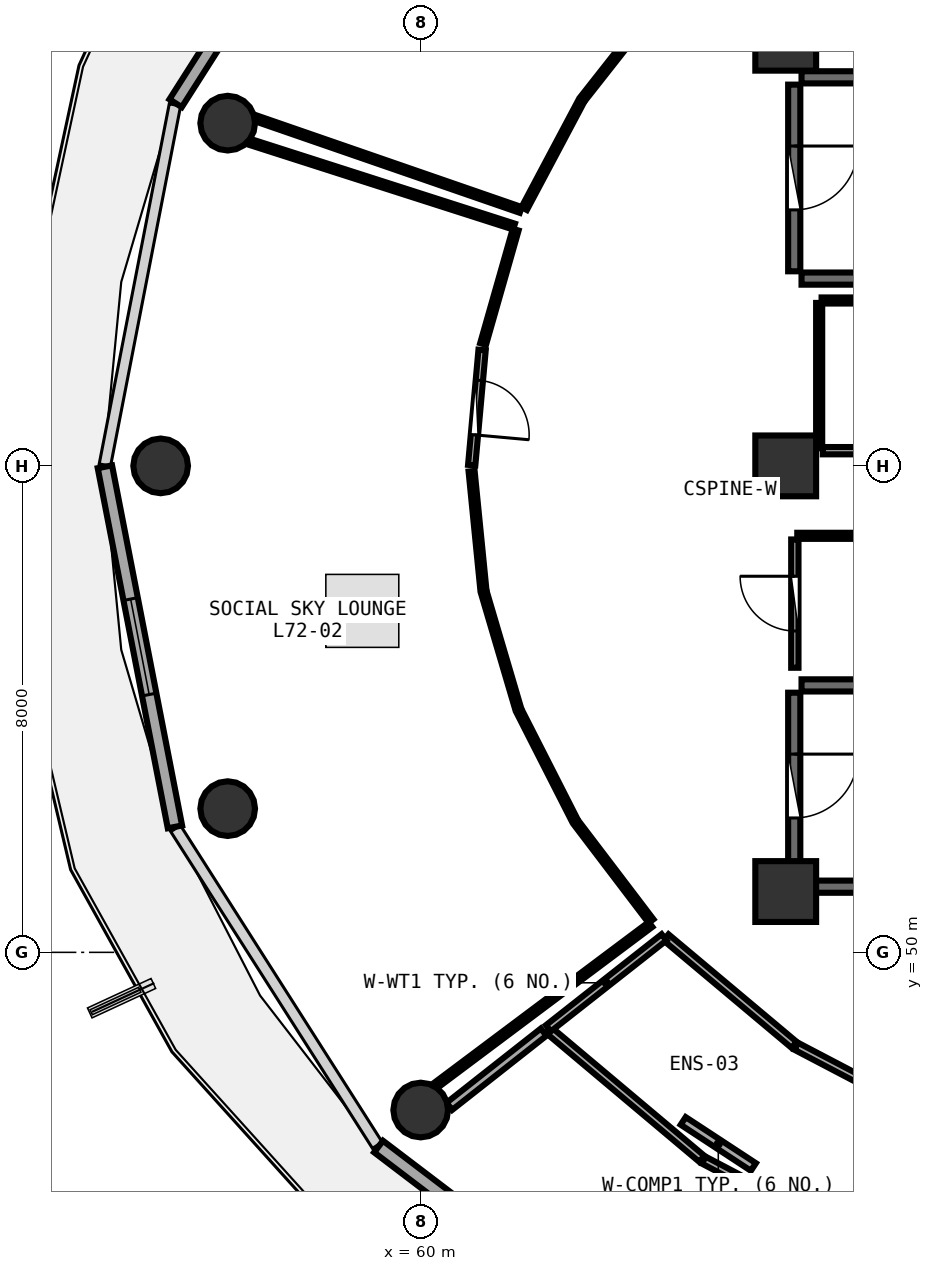
"""IFC4 building model, lengths in metres.
Left out: names, types, materials, properties, quantities, classifications, styles, units other than length and angle.
Written with IfcOpenShell. Run it as: python <this file> out.ifc"""

import sys

from ifc_helpers import new_model, si_unit, direction, frame, frame_2d, origin, origin_2d, place, context, subcontext, project, spatial, rectangle, circle, extrude, element, fill, save


model = new_model("IFC4")
c1 = context("Model", 3, precision=1e-05, world=origin(), true_north=direction((0.0, 1.0)))
c2 = subcontext(c1, "Body", "Model", "MODEL_VIEW")
j1 = project(units=[si_unit("LENGTHUNIT", "METRE"), si_unit("PLANEANGLEUNIT", "RADIAN")], contexts=[c1])
p1 = place(None, origin())
s1 = spatial("IfcSite", under=j1, at=p1, CompositionType="ELEMENT")
p2 = place(p1, origin())
s2 = spatial("IfcBuilding", under=s1, at=p2, CompositionType="ELEMENT")
p3 = place(p2, frame((0.0, 0.0, 282.45)))
s3 = spatial("IfcBuildingStorey", under=s2, at=p3, CompositionType="ELEMENT", Elevation=282.45)
for number, where, z_axis, x_axis in (
    (1, (66.0, 51.0, 0.0), (0.0, 0.0, 1.0), (1.0, 0.0, 0.0)),
    (2, (66.0, 65.0, 0.0), (0.0, 0.0, 1.0), (1.0, 0.0, 0.0)),
    (3, (66.0, 58.0, 0.0), (0.0, 0.0, 1.0), (1.0, 0.0, 0.0)),
):
    element("IfcColumn", number, at=place(p3, frame(where, z_axis=z_axis, x_axis=x_axis)), inside=s3, PredefinedType="PILASTER", context=c2, shape_type="SweptSolid", body=[
        extrude(rectangle(XDim=1.0, YDim=1.0, at=origin_2d()), origin(), (0.0, 0.0, 1.0), 3.75),
    ])
for number, where, z_axis, x_axis in (
    (4, (56.823, 63.636, 0.0), (0.0, 0.0, 1.0), (1.0, 0.0, 0.0)),
    (5, (55.72, 58.0, 0.0), (0.0, 0.0, 1.0), (1.0, 0.0, 0.0)),
    (6, (56.823, 52.364, 0.0), (0.0, 0.0, 1.0), (1.0, 0.0, 0.0)),
    (7, (59.997, 47.407, 0.0), (0.0, 0.0, 1.0), (1.0, 0.0, 0.0)),
):
    element("IfcColumn", number, at=place(p3, frame(where, z_axis=z_axis, x_axis=x_axis)), inside=s3, PredefinedType="COLUMN", context=c2, shape_type="SweptSolid", body=[
        extrude(circle(Radius=0.45, at=origin_2d()), origin(), (0.0, 0.0, 1.0), 3.75),
    ])
p4 = place(p3, frame((59.284, 69.172, 0.0), z_axis=(0.0, 0.0, 1.0), x_axis=(-0.537271968456, -0.843409053728, 0.0)))
e8 = element("IfcWall", 8, at=p4, inside=s3, PredefinedType="SOLIDWALL", context=c2, shape_type="SweptSolid", body=[
    extrude(rectangle(XDim=6.175, YDim=0.24, at=frame_2d((3.087, 0.0))), origin(), (0.0, 0.0, 1.0), 3.475),
])
p5 = place(p4, frame((2.613, 0.0, 0.0)))
e9 = element("IfcOpeningElement", 9, at=p5, cuts=e8, PredefinedType="OPENING", context=c2, shape_type="SweptSolid", body=[
    extrude(rectangle(XDim=0.95, YDim=2.1, at=frame_2d((0.475, 1.05))), frame((0.0, 0.13, 0.0), z_axis=(0.0, -1.0, 0.0), x_axis=(1.0, 0.0, 0.0)), (0.0, 0.0, 1.0), 0.26),
])
p6 = place(p4, frame((3.913, 0.0, 0.85)))
e10 = element("IfcOpeningElement", 10, at=p6, cuts=e8, PredefinedType="OPENING", context=c2, shape_type="SweptSolid", body=[
    extrude(rectangle(XDim=1.2, YDim=1.45, at=frame_2d((0.6, 0.725))), frame((0.0, 0.13, 0.0), z_axis=(0.0, -1.0, 0.0), x_axis=(1.0, 0.0, 0.0)), (0.0, 0.0, 1.0), 0.26),
])
p7 = place(p3, frame((54.803, 57.985, 0.0), z_axis=(0.0, 0.0, 1.0), x_axis=(0.190969309115, -0.981596008028, 0.0)))
e11 = element("IfcWall", 11, at=p7, inside=s3, PredefinedType="SOLIDWALL", context=c2, shape_type="SweptSolid", body=[
    extrude(rectangle(XDim=6.033, YDim=0.24, at=frame_2d((3.017, 0.0))), origin(), (0.0, 0.0, 1.0), 3.475),
])
p8 = place(p7, frame((2.216, 0.0, 0.85)))
e12 = element("IfcOpeningElement", 12, at=p8, cuts=e11, PredefinedType="OPENING", context=c2, shape_type="SweptSolid", body=[
    extrude(rectangle(XDim=1.6, YDim=1.45, at=frame_2d((0.8, 0.725))), frame((0.0, 0.13, 0.0), z_axis=(0.0, -1.0, 0.0), x_axis=(1.0, 0.0, 0.0)), (0.0, 0.0, 1.0), 0.26),
])
p9 = place(p3, frame((59.304, 46.806, 0.0), z_axis=(0.0, 0.0, 1.0), x_axis=(0.796010444211, -0.605282886514, 0.0)))
e13 = element("IfcWall", 13, at=p9, inside=s3, PredefinedType="SOLIDWALL", context=c2, shape_type="SweptSolid", body=[
    extrude(rectangle(XDim=6.387, YDim=0.24, at=frame_2d((3.194, 0.0))), origin(), (0.0, 0.0, 1.0), 3.475),
])
p10 = place(p9, frame((2.394, 0.0, 0.85)))
e14 = element("IfcOpeningElement", 14, at=p10, cuts=e13, PredefinedType="OPENING", context=c2, shape_type="SweptSolid", body=[
    extrude(rectangle(XDim=1.6, YDim=1.45, at=frame_2d((0.8, 0.725))), frame((0.0, 0.13, 0.0), z_axis=(0.0, -1.0, 0.0), x_axis=(1.0, 0.0, 0.0)), (0.0, 0.0, 1.0), 0.26),
])
for number, where, z_axis, x_axis in (
    (15, (66.26, 61.08, 0.0), (0.0, 0.0, 1.0), (1.0, 0.0, 0.0)),
    (16, (73.42, 64.39, 0.0), (0.0, 0.0, 1.0), (-1.0, 0.0, 0.0)),
):
    element("IfcWall", number, at=place(p3, frame(where, z_axis=z_axis, x_axis=x_axis)), inside=s3, PredefinedType="SHEAR", context=c2, shape_type="SweptSolid", body=[
        extrude(rectangle(XDim=7.16, YDim=0.2, at=frame_2d((3.58, 0.0))), origin(), (0.0, 0.0, 1.0), 3.49),
    ])
p11 = place(p3, frame((66.14, 64.27, 0.0), z_axis=(0.0, 0.0, 1.0), x_axis=(0.0, -1.0, 0.0)))
e17 = element("IfcWall", 17, at=p11, inside=s3, PredefinedType="SHEAR", context=c2, shape_type="SweptSolid", body=[
    extrude(rectangle(XDim=3.07, YDim=0.2, at=frame_2d((1.535, 0.0))), origin(), (0.0, 0.0, 1.0), 3.49),
])
p12 = place(p11, frame((1.01, 0.0, 0.0)))
e18 = element("IfcOpeningElement", 18, at=p12, cuts=e17, PredefinedType="OPENING", context=c2, shape_type="SweptSolid", body=[
    extrude(rectangle(XDim=1.05, YDim=2.1, at=frame_2d((0.525, 1.05))), frame((0.0, 0.11, 0.0), z_axis=(0.0, -1.0, 0.0), x_axis=(1.0, 0.0, 0.0)), (0.0, 0.0, 1.0), 0.22),
])
for number, where, z_axis, x_axis in (
    (19, (66.26, 51.08, 0.0), (0.0, 0.0, 1.0), (1.0, 0.0, 0.0)),
    (20, (73.42, 54.39, 0.0), (0.0, 0.0, 1.0), (-1.0, 0.0, 0.0)),
):
    element("IfcWall", number, at=place(p3, frame(where, z_axis=z_axis, x_axis=x_axis)), inside=s3, PredefinedType="SHEAR", context=c2, shape_type="SweptSolid", body=[
        extrude(rectangle(XDim=7.16, YDim=0.2, at=frame_2d((3.58, 0.0))), origin(), (0.0, 0.0, 1.0), 3.49),
    ])
p13 = place(p3, frame((66.14, 54.27, 0.0), z_axis=(0.0, 0.0, 1.0), x_axis=(0.0, -1.0, 0.0)))
e21 = element("IfcWall", 21, at=p13, inside=s3, PredefinedType="SHEAR", context=c2, shape_type="SweptSolid", body=[
    extrude(rectangle(XDim=3.07, YDim=0.2, at=frame_2d((1.535, 0.0))), origin(), (0.0, 0.0, 1.0), 3.49),
])
p14 = place(p13, frame((1.01, 0.0, 0.0)))
e22 = element("IfcOpeningElement", 22, at=p14, cuts=e21, PredefinedType="OPENING", context=c2, shape_type="SweptSolid", body=[
    extrude(rectangle(XDim=1.05, YDim=2.1, at=frame_2d((0.525, 1.05))), frame((0.0, 0.11, 0.0), z_axis=(0.0, -1.0, 0.0), x_axis=(1.0, 0.0, 0.0)), (0.0, 0.0, 1.0), 0.22),
])
p15 = place(p3, frame((66.61, 58.25, 0.0), z_axis=(0.0, 0.0, 1.0), x_axis=(1.0, 0.0, 0.0)))
e23 = element("IfcWall", 23, at=p15, inside=s3, PredefinedType="PARTITIONING", context=c2, shape_type="SweptSolid", body=[
    extrude(rectangle(XDim=3.33, YDim=0.12, at=frame_2d((1.665, 0.0))), origin(), (0.0, 0.0, 1.0), 3.48),
])
p16 = place(p15, frame((1.215, 0.0, 0.0)))
e24 = element("IfcOpeningElement", 24, at=p16, cuts=e23, PredefinedType="OPENING", context=c2, shape_type="SweptSolid", body=[
    extrude(rectangle(XDim=0.9, YDim=2.08, at=frame_2d((0.45, 1.04))), frame((0.0, 0.07, 0.0), z_axis=(0.0, -1.0, 0.0), x_axis=(1.0, 0.0, 0.0)), (0.0, 0.0, 1.0), 0.14),
])
p17 = place(p3, frame((66.15, 54.68, 0.0), z_axis=(0.0, 0.0, 1.0), x_axis=(0.0, 1.0, 0.0)))
e25 = element("IfcWall", 25, at=p17, inside=s3, PredefinedType="PARTITIONING", context=c2, shape_type="SweptSolid", body=[
    extrude(rectangle(XDim=2.11, YDim=0.12, at=frame_2d((1.055, 0.0))), origin(), (0.0, 0.0, 1.0), 2.775),
])
p18 = place(p17, frame((0.605, 0.0, 0.0)))
e26 = element("IfcOpeningElement", 26, at=p18, cuts=e25, PredefinedType="OPENING", context=c2, shape_type="SweptSolid", body=[
    extrude(rectangle(XDim=0.9, YDim=2.08, at=frame_2d((0.45, 1.04))), frame((0.0, 0.07, 0.0), z_axis=(0.0, -1.0, 0.0), x_axis=(1.0, 0.0, 0.0)), (0.0, 0.0, 1.0), 0.14),
])
p19 = place(p3, frame((61.007, 59.906, 0.0), z_axis=(0.0, 0.0, 1.0), x_axis=(-0.089968706127, -0.995944592795, 0.0)))
e27 = element("IfcWall", 27, at=p19, inside=s3, PredefinedType="PARTITIONING", context=c2, shape_type="SweptSolid", body=[
    extrude(rectangle(XDim=1.902, YDim=0.12, at=frame_2d((0.951, 0.0))), origin(), (0.0, 0.0, 1.0), 3.075),
])
p20 = place(p19, frame((0.501, 0.0, 0.0)))
e28 = element("IfcOpeningElement", 28, at=p20, cuts=e27, PredefinedType="OPENING", context=c2, shape_type="SweptSolid", body=[
    extrude(rectangle(XDim=0.9, YDim=2.08, at=frame_2d((0.45, 1.04))), frame((0.0, 0.07, 0.0), z_axis=(0.0, -1.0, 0.0), x_axis=(1.0, 0.0, 0.0)), (0.0, 0.0, 1.0), 0.14),
])
p21 = place(p3, frame((69.96, 60.72, 0.0), z_axis=(0.0, 0.0, 1.0), x_axis=(-1.0, 0.0, 0.0)))
e29 = element("IfcWall", 29, at=p21, inside=s3, PredefinedType="PARTITIONING", context=c2, shape_type="SweptSolid", body=[
    extrude(rectangle(XDim=3.37, YDim=0.1, at=frame_2d((1.685, 0.0))), origin(), (0.0, 0.0, 1.0), 3.48),
])
p22 = place(p3, frame((66.55, 60.68, 0.0), z_axis=(0.0, 0.0, 1.0), x_axis=(0.0, -1.0, 0.0)))
e30 = element("IfcWall", 30, at=p22, inside=s3, PredefinedType="PARTITIONING", context=c2, shape_type="SweptSolid", body=[
    extrude(rectangle(XDim=2.39, YDim=0.1, at=frame_2d((1.195, 0.0))), origin(), (0.0, 0.0, 1.0), 3.48),
])
p23 = place(p3, frame((71.76, 56.85, 0.0), z_axis=(0.0, 0.0, 1.0), x_axis=(-1.0, 0.0, 0.0)))
e31 = element("IfcWall", 31, at=p23, inside=s3, PredefinedType="PARTITIONING", context=c2, shape_type="SweptSolid", body=[
    extrude(rectangle(XDim=5.57, YDim=0.1, at=frame_2d((2.785, 0.0))), origin(), (0.0, 0.0, 1.0), 2.775),
])
p24 = place(p3, frame((63.921, 65.635, 0.0), z_axis=(0.0, 0.0, 1.0), x_axis=(-0.618820199788, -0.785532660259, 0.0)))
e32 = element("IfcWall", 32, at=p24, inside=s3, PredefinedType="PARTITIONING", context=c2, shape_type="SweptSolid", body=[
    extrude(rectangle(XDim=2.018, YDim=0.1, at=frame_2d((1.009, 0.0))), origin(), (0.0, 0.0, 1.0), 3.075),
])
p25 = place(p3, frame((62.629, 63.984, 0.0), z_axis=(0.0, 0.0, 1.0), x_axis=(-0.468933294906, -0.883233584579, 0.0)))
e33 = element("IfcWall", 33, at=p25, inside=s3, PredefinedType="PARTITIONING", context=c2, shape_type="SweptSolid", body=[
    extrude(rectangle(XDim=1.984, YDim=0.1, at=frame_2d((0.992, 0.0))), origin(), (0.0, 0.0, 1.0), 3.235),
])
p26 = place(p3, frame((61.642, 62.209, 0.0), z_axis=(0.0, 0.0, 1.0), x_axis=(-0.945103281494, 0.326771766388, 0.0)))
e34 = element("IfcWall", 34, at=p26, inside=s3, PredefinedType="PARTITIONING", context=c2, shape_type="SweptSolid", body=[
    extrude(rectangle(XDim=4.604, YDim=0.1, at=frame_2d((2.302, 0.0))), origin(), (0.0, 0.0, 1.0), 3.075),
])
p27 = place(p3, frame((61.559, 61.885, 0.0), z_axis=(0.0, 0.0, 1.0), x_axis=(-0.274226302341, -0.961665188673, 0.0)))
e35 = element("IfcWall", 35, at=p27, inside=s3, PredefinedType="PARTITIONING", context=c2, shape_type="SweptSolid", body=[
    extrude(rectangle(XDim=1.955, YDim=0.1, at=frame_2d((0.978, 0.0))), origin(), (0.0, 0.0, 1.0), 3.48),
])
p28 = place(p3, frame((60.834, 57.912, 0.0), z_axis=(0.0, 0.0, 1.0), x_axis=(0.098769631998, -0.995110325439, 0.0)))
e36 = element("IfcWall", 36, at=p28, inside=s3, PredefinedType="PARTITIONING", context=c2, shape_type="SweptSolid", body=[
    extrude(rectangle(XDim=1.943, YDim=0.1, at=frame_2d((0.971, 0.0))), origin(), (0.0, 0.0, 1.0), 3.075),
])
p29 = place(p3, frame((61.041, 55.901, 0.0), z_axis=(0.0, 0.0, 1.0), x_axis=(0.28293653612, -0.959138632591, 0.0)))
e37 = element("IfcWall", 37, at=p29, inside=s3, PredefinedType="PARTITIONING", context=c2, shape_type="SweptSolid", body=[
    extrude(rectangle(XDim=1.956, YDim=0.1, at=frame_2d((0.978, 0.0))), origin(), (0.0, 0.0, 1.0), 3.48),
])
p30 = place(p3, frame((61.624, 53.95, 0.0), z_axis=(0.0, 0.0, 1.0), x_axis=(0.453658133306, -0.891175795276, 0.0)))
e38 = element("IfcWall", 38, at=p30, inside=s3, PredefinedType="PARTITIONING", context=c2, shape_type="SweptSolid", body=[
    extrude(rectangle(XDim=1.981, YDim=0.1, at=frame_2d((0.991, 0.0))), origin(), (0.0, 0.0, 1.0), 3.235),
])
p31 = place(p3, frame((62.565, 52.117, 0.0), z_axis=(0.0, 0.0, 1.0), x_axis=(0.605473441765, -0.795865510823, 0.0)))
e39 = element("IfcWall", 39, at=p31, inside=s3, PredefinedType="PARTITIONING", context=c2, shape_type="SweptSolid", body=[
    extrude(rectangle(XDim=2.014, YDim=0.1, at=frame_2d((1.007, 0.0))), origin(), (0.0, 0.0, 1.0), 3.075),
])
p32 = place(p3, frame((63.777, 50.458, 0.0), z_axis=(0.0, 0.0, 1.0), x_axis=(-0.800384816546, -0.599486568191, 0.0)))
e40 = element("IfcWall", 40, at=p32, inside=s3, PredefinedType="PARTITIONING", context=c2, shape_type="SweptSolid", body=[
    extrude(rectangle(XDim=4.414, YDim=0.1, at=frame_2d((2.207, 0.0))), origin(), (0.0, 0.0, 1.0), 3.175),
])
p33 = place(p3, frame((57.184, 63.329, 0.0), z_axis=(0.0, 0.0, 1.0), x_axis=(0.95227750557, -0.305233602976, 0.0)))
e41 = element("IfcWall", 41, at=p33, inside=s3, PredefinedType="PARTITIONING", context=c2, shape_type="SweptSolid", body=[
    extrude(rectangle(XDim=4.565, YDim=0.1, at=frame_2d((2.283, 0.0))), origin(), (0.0, 0.0, 1.0), 3.175),
])
p34 = place(p3, frame((64.03, 50.247, 0.0), z_axis=(0.0, 0.0, 1.0), x_axis=(0.766167599315, -0.642640809286, 0.0)))
e42 = element("IfcWall", 42, at=p34, inside=s3, PredefinedType="PLUMBINGWALL", context=c2, shape_type="SweptSolid", body=[
    extrude(rectangle(XDim=2.753, YDim=0.13, at=frame_2d((1.376, 0.0))), origin(), (0.0, 0.0, 1.0), 3.075),
])
p35 = place(p3, frame((66.173, 48.456, 0.0), z_axis=(0.0, 0.0, 1.0), x_axis=(0.885795858503, -0.464075098512, 0.0)))
e43 = element("IfcWall", 43, at=p35, inside=s3, PredefinedType="PLUMBINGWALL", context=c2, shape_type="SweptSolid", body=[
    extrude(rectangle(XDim=2.813, YDim=0.13, at=frame_2d((1.406, 0.0))), origin(), (0.0, 0.0, 1.0), 3.235),
])
p36 = place(p3, frame((67.633, 45.016, 0.0), z_axis=(0.0, 0.0, 1.0), x_axis=(-0.885210583291, 0.465190523581, 0.0)))
e44 = element("IfcWall", 44, at=p36, inside=s3, PredefinedType="PLUMBINGWALL", context=c2, shape_type="SweptSolid", body=[
    extrude(rectangle(XDim=3.367, YDim=0.13, at=frame_2d((1.684, 0.0))), origin(), (0.0, 0.0, 1.0), 3.075),
])
p37 = place(p3, frame((64.62, 46.605, 0.0), z_axis=(0.0, 0.0, 1.0), x_axis=(-0.765494729633, 0.643442164382, 0.0)))
e45 = element("IfcWall", 45, at=p37, inside=s3, PredefinedType="PLUMBINGWALL", context=c2, shape_type="SweptSolid", body=[
    extrude(rectangle(XDim=3.296, YDim=0.13, at=frame_2d((1.648, 0.0))), origin(), (0.0, 0.0, 1.0), 3.075),
])
p38 = place(p3, frame((62.097, 48.751, 0.0), z_axis=(0.0, 0.0, 1.0), x_axis=(0.786076764473, 0.618128886525, 0.0)))
e46 = element("IfcWall", 46, at=p38, inside=s3, PredefinedType="PLUMBINGWALL", context=c2, shape_type="SweptSolid", body=[
    extrude(rectangle(XDim=2.42, YDim=0.13, at=frame_2d((1.21, 0.0))), origin(), (0.0, 0.0, 1.0), 3.075),
])
p39 = place(p3, frame((60.468, 47.468, 0.0), z_axis=(0.0, 0.0, 1.0), x_axis=(0.785768578647, 0.618520606618, 0.0)))
e47 = element("IfcWall", 47, at=p39, inside=s3, PredefinedType="PARTITIONING", context=c2, shape_type="SweptSolid", body=[
    extrude(rectangle(XDim=1.974, YDim=0.15, at=frame_2d((0.987, 0.0))), origin(), (0.0, 0.0, 1.0), 3.075),
])
p40 = place(p3, frame((64.314, 47.228, 0.0), z_axis=(0.0, 0.0, 1.0), x_axis=(0.836108744157, -0.54856373189, 0.0)))
e48 = element("IfcWall", 48, at=p40, inside=s3, PredefinedType="PARTITIONING", context=c2, shape_type="SweptSolid", body=[
    extrude(rectangle(XDim=1.381, YDim=0.15, at=frame_2d((0.69, 0.0))), origin(), (0.0, 0.0, 1.0), 3.075),
])
p41 = place(p8, origin())
e49 = element("IfcWindow", 49, at=p41, inside=s3, PartitioningType="SINGLE_PANEL", PredefinedType="WINDOW", context=c2, shape_type="SweptSolid", body=[
    extrude(rectangle(XDim=1.6, YDim=1.45, at=frame_2d((0.8, 0.725))), frame((0.0, 0.03, 0.0), z_axis=(0.0, -1.0, 0.0), x_axis=(1.0, 0.0, 0.0)), (0.0, 0.0, 1.0), 0.06),
])
fill(e12, e49)
p42 = place(p12, origin())
e50 = element("IfcDoor", 50, at=p42, inside=s3, OperationType="SINGLE_SWING_LEFT", PredefinedType="DOOR", context=c2, shape_type="SweptSolid", body=[
    extrude(rectangle(XDim=1.05, YDim=2.1, at=frame_2d((0.525, 1.05))), frame((0.0, 0.025, 0.0), z_axis=(0.0, -1.0, 0.0), x_axis=(1.0, 0.0, 0.0)), (0.0, 0.0, 1.0), 0.05),
])
fill(e18, e50)
p43 = place(p14, origin())
e51 = element("IfcDoor", 51, at=p43, inside=s3, OperationType="SINGLE_SWING_LEFT", PredefinedType="DOOR", context=c2, shape_type="SweptSolid", body=[
    extrude(rectangle(XDim=1.05, YDim=2.1, at=frame_2d((0.525, 1.05))), frame((0.0, 0.025, 0.0), z_axis=(0.0, -1.0, 0.0), x_axis=(1.0, 0.0, 0.0)), (0.0, 0.0, 1.0), 0.05),
])
fill(e22, e51)
p44 = place(p18, origin())
e52 = element("IfcDoor", 52, at=p44, inside=s3, OperationType="SINGLE_SWING_RIGHT", PredefinedType="DOOR", context=c2, shape_type="SweptSolid", body=[
    extrude(rectangle(XDim=0.9, YDim=2.08, at=frame_2d((0.45, 1.04))), frame((0.0, 0.025, 0.0), z_axis=(0.0, -1.0, 0.0), x_axis=(1.0, 0.0, 0.0)), (0.0, 0.0, 1.0), 0.05),
])
fill(e26, e52)
p45 = place(p20, origin())
e53 = element("IfcDoor", 53, at=p45, inside=s3, OperationType="SINGLE_SWING_RIGHT", PredefinedType="DOOR", context=c2, shape_type="SweptSolid", body=[
    extrude(rectangle(XDim=0.9, YDim=2.08, at=frame_2d((0.45, 1.04))), frame((0.0, 0.025, 0.0), z_axis=(0.0, -1.0, 0.0), x_axis=(1.0, 0.0, 0.0)), (0.0, 0.0, 1.0), 0.05),
])
fill(e28, e53)
save(model, sys.argv[1])
